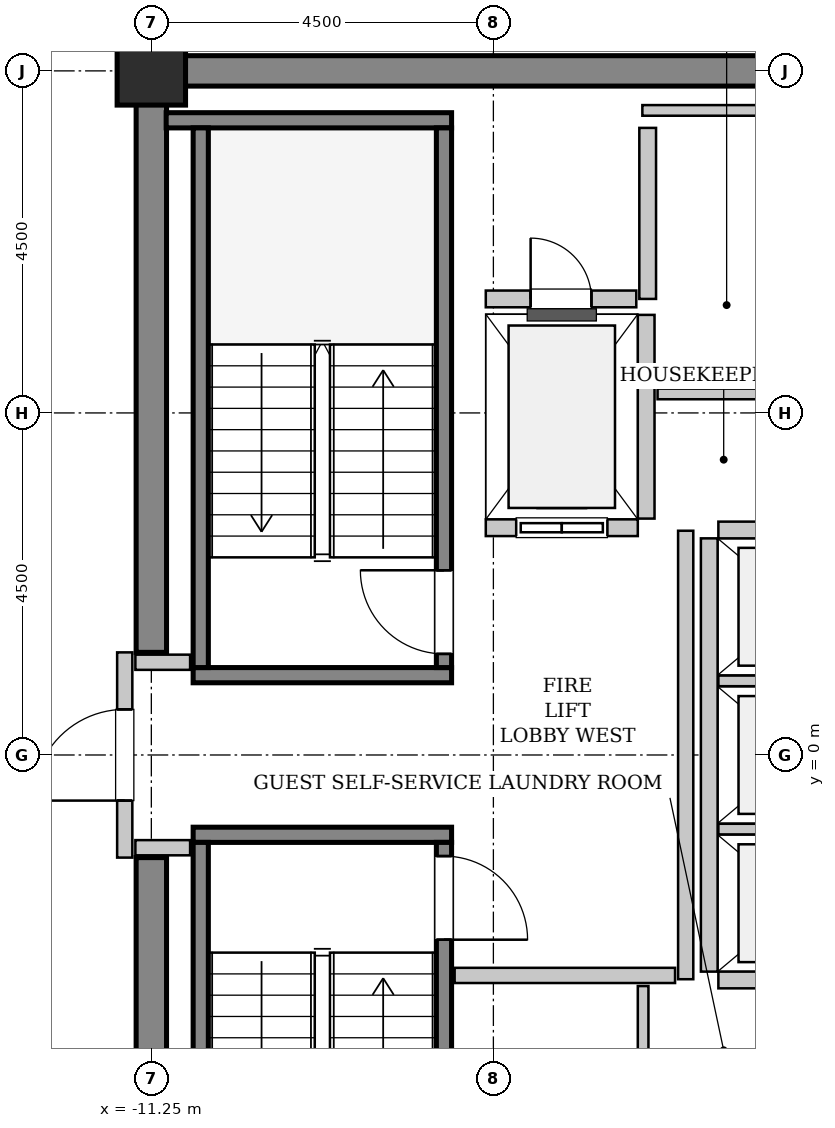
"""IFC4 building model, lengths in metres.
Left out: names, types, materials, properties, quantities, classifications, styles, units other than length and angle.
Written with IfcOpenShell. Run it as: python <this file> out.ifc"""

import sys

from ifc_helpers import new_model, si_unit, direction, frame, frame_2d, origin, origin_2d, place, context, subcontext, project, spatial, rectangle, extrude, source, transform, mapped, element, fill, save


model = new_model("IFC4")
c1 = context("Model", 3, precision=1e-05, world=origin(), true_north=direction((0.0, 1.0)))
c2 = subcontext(c1, "Body", "Model", "MODEL_VIEW")
j1 = project(units=[si_unit("LENGTHUNIT", "METRE"), si_unit("PLANEANGLEUNIT", "RADIAN")], contexts=[c1])
p1 = place(None, origin())
s1 = spatial("IfcSite", under=j1, at=p1, CompositionType="ELEMENT")
p2 = place(p1, origin())
s2 = spatial("IfcBuilding", under=s1, at=p2, CompositionType="ELEMENT")
p3 = place(p2, frame((0.0, 0.0, 333.8)))
s3 = spatial("IfcBuildingStorey", under=s2, at=p3, CompositionType="ELEMENT", Elevation=333.8)
m1 = source(origin(), c2, "Body", "SweptSolid", [
    extrude(rectangle(XDim=9.9, YDim=0.4, at=frame_2d((4.95, 0.0))), origin(), (0.0, 0.0, 1.0), 3.8),
])
p4 = place(p3, frame((-11.45, 9.0, 0.0), z_axis=(0.0, 0.0, 1.0), x_axis=(1.0, 0.0, 0.0)))
e1 = element("IfcWall", 1, at=p4, inside=s3, PredefinedType="SHEAR", context=c2, shape_type="MappedRepresentation", body=[
    mapped(m1, transform((0.0, 0.0, 0.0), x_axis=(1.0, 0.0, 0.0), y_axis=(0.0, 1.0, 0.0), z_axis=(0.0, 0.0, 1.0), scale=1.0)),
])
m2 = source(origin(), c2, "Body", "SweptSolid", [
    extrude(rectangle(XDim=7.45, YDim=0.4, at=frame_2d((3.725, 0.0))), origin(), (0.0, 0.0, 1.0), 3.8),
])
for number, where, z_axis, x_axis in (
    (2, (-11.25, -8.8, 0.0), (0.0, 0.0, 1.0), (0.0, 1.0, 0.0)),
    (3, (-11.25, 1.35, 0.0), (0.0, 0.0, 1.0), (0.0, 1.0, 0.0)),
):
    element("IfcWall", number, at=place(p3, frame(where, z_axis=z_axis, x_axis=x_axis)), inside=s3, PredefinedType="SHEAR", context=c2, shape_type="MappedRepresentation", body=[
        mapped(m2, transform((0.0, 0.0, 0.0), x_axis=(1.0, 0.0, 0.0), y_axis=(0.0, 1.0, 0.0), z_axis=(0.0, 0.0, 1.0), scale=1.0)),
    ])
m3 = source(origin(), c2, "Body", "SweptSolid", [
    extrude(rectangle(XDim=0.9, YDim=0.9, at=origin_2d()), origin(), (0.0, 0.0, 1.0), 3.8),
])
p5 = place(p3, frame((-11.25, 9.0, 0.0), z_axis=(0.0, 0.0, 1.0), x_axis=(1.0, 0.0, 0.0)))
e4 = element("IfcColumn", 4, at=p5, inside=s3, PredefinedType="COLUMN", context=c2, shape_type="MappedRepresentation", body=[
    mapped(m3, transform((0.0, 0.0, 0.0), x_axis=(1.0, 0.0, 0.0), y_axis=(0.0, 1.0, 0.0), z_axis=(0.0, 0.0, 1.0), scale=1.0)),
])
m4 = source(origin(), c2, "Body", "SweptSolid", [
    extrude(rectangle(XDim=3.4, YDim=0.2, at=frame_2d((1.7, 0.0))), origin(), (0.0, 0.0, 1.0), 3.8),
])
p6 = place(p3, frame((-7.3, 1.05, 0.0), z_axis=(0.0, 0.0, 1.0), x_axis=(-1.0, 0.0, 0.0)))
e5 = element("IfcWall", 5, at=p6, inside=s3, PredefinedType="SOLIDWALL", context=c2, shape_type="MappedRepresentation", body=[
    mapped(m4, transform((0.0, 0.0, 0.0), x_axis=(1.0, 0.0, 0.0), y_axis=(0.0, 1.0, 0.0), z_axis=(0.0, 0.0, 1.0), scale=1.0)),
])
m5 = source(origin(), c2, "Body", "SweptSolid", [
    extrude(rectangle(XDim=3.755, YDim=0.2, at=frame_2d((1.877, 0.0))), origin(), (0.0, 0.0, 1.0), 3.8),
])
p7 = place(p3, frame((-7.3, 8.35, 0.0), z_axis=(0.0, 0.0, 1.0), x_axis=(-1.0, 0.0, 0.0)))
e6 = element("IfcWall", 6, at=p7, inside=s3, PredefinedType="SOLIDWALL", context=c2, shape_type="MappedRepresentation", body=[
    mapped(m5, transform((0.0, 0.0, 0.0), x_axis=(1.0, 0.0, 0.0), y_axis=(0.0, 1.0, 0.0), z_axis=(0.0, 0.0, 1.0), scale=1.0)),
])
m6 = source(origin(), c2, "Body", "SweptSolid", [
    extrude(rectangle(XDim=7.1, YDim=0.2, at=frame_2d((3.55, 0.0))), origin(), (0.0, 0.0, 1.0), 3.8),
])
p8 = place(p3, frame((-7.4, 1.15, 0.0), z_axis=(0.0, 0.0, 1.0), x_axis=(0.0, 1.0, 0.0)))
e7 = element("IfcWall", 7, at=p8, inside=s3, PredefinedType="SOLIDWALL", context=c2, shape_type="MappedRepresentation", body=[
    mapped(m6, transform((0.0, 0.0, 0.0), x_axis=(1.0, 0.0, 0.0), y_axis=(0.0, 1.0, 0.0), z_axis=(0.0, 0.0, 1.0), scale=1.0)),
])
p9 = place(p8, frame((0.18, 0.0, 0.0)))
e8 = element("IfcOpeningElement", 8, at=p9, cuts=e7, PredefinedType="OPENING", context=c2, shape_type="SweptSolid", body=[
    extrude(rectangle(XDim=1.1, YDim=2.15, at=frame_2d((0.55, 1.075))), frame((0.0, 0.11, 0.0), z_axis=(0.0, -1.0, 0.0), x_axis=(1.0, 0.0, 0.0)), (0.0, 0.0, 1.0), 0.22),
])
p10 = place(p3, frame((-10.6, 1.15, 0.0), z_axis=(0.0, 0.0, 1.0), x_axis=(0.0, 1.0, 0.0)))
e9 = element("IfcWall", 9, at=p10, inside=s3, PredefinedType="SOLIDWALL", context=c2, shape_type="MappedRepresentation", body=[
    mapped(m6, transform((0.0, 0.0, 0.0), x_axis=(1.0, 0.0, 0.0), y_axis=(0.0, 1.0, 0.0), z_axis=(0.0, 0.0, 1.0), scale=1.0)),
])
p11 = place(p3, frame((-10.7, -1.05, 0.0), z_axis=(0.0, 0.0, 1.0), x_axis=(1.0, 0.0, 0.0)))
e10 = element("IfcWall", 10, at=p11, inside=s3, PredefinedType="SOLIDWALL", context=c2, shape_type="MappedRepresentation", body=[
    mapped(m4, transform((0.0, 0.0, 0.0), x_axis=(1.0, 0.0, 0.0), y_axis=(0.0, 1.0, 0.0), z_axis=(0.0, 0.0, 1.0), scale=1.0)),
])
p12 = place(p3, frame((-10.6, -1.15, 0.0), z_axis=(0.0, 0.0, 1.0), x_axis=(0.0, -1.0, 0.0)))
e11 = element("IfcWall", 11, at=p12, inside=s3, PredefinedType="SOLIDWALL", context=c2, shape_type="MappedRepresentation", body=[
    mapped(m6, transform((0.0, 0.0, 0.0), x_axis=(1.0, 0.0, 0.0), y_axis=(0.0, 1.0, 0.0), z_axis=(0.0, 0.0, 1.0), scale=1.0)),
])
p13 = place(p3, frame((-7.4, -1.15, 0.0), z_axis=(0.0, 0.0, 1.0), x_axis=(0.0, -1.0, 0.0)))
e12 = element("IfcWall", 12, at=p13, inside=s3, PredefinedType="SOLIDWALL", context=c2, shape_type="MappedRepresentation", body=[
    mapped(m6, transform((0.0, 0.0, 0.0), x_axis=(1.0, 0.0, 0.0), y_axis=(0.0, 1.0, 0.0), z_axis=(0.0, 0.0, 1.0), scale=1.0)),
])
p14 = place(p13, frame((0.18, 0.0, 0.0)))
e13 = element("IfcOpeningElement", 13, at=p14, cuts=e12, PredefinedType="OPENING", context=c2, shape_type="SweptSolid", body=[
    extrude(rectangle(XDim=1.1, YDim=2.15, at=frame_2d((0.55, 1.075))), frame((0.0, 0.11, 0.0), z_axis=(0.0, -1.0, 0.0), x_axis=(1.0, 0.0, 0.0)), (0.0, 0.0, 1.0), 0.22),
])
m7 = source(origin(), c2, "Body", "SweptSolid", [
    extrude(rectangle(XDim=2.0, YDim=0.22, at=frame_2d((1.0, 0.0))), origin(), (0.0, 0.0, 1.0), 3.535),
])
p15 = place(p3, frame((-6.85, 2.99, 0.0), z_axis=(0.0, 0.0, 1.0), x_axis=(1.0, 0.0, 0.0)))
e14 = element("IfcWall", 14, at=p15, inside=s3, PredefinedType="SOLIDWALL", context=c2, shape_type="MappedRepresentation", body=[
    mapped(m7, transform((0.0, 0.0, 0.0), x_axis=(1.0, 0.0, 0.0), y_axis=(0.0, 1.0, 0.0), z_axis=(0.0, 0.0, 1.0), scale=1.0)),
])
p16 = place(p15, frame((0.4, 0.0, 0.0)))
e15 = element("IfcOpeningElement", 15, at=p16, cuts=e14, PredefinedType="OPENING", context=c2, shape_type="SweptSolid", body=[
    extrude(rectangle(XDim=1.2, YDim=2.2, at=frame_2d((0.6, 1.1))), frame((0.0, 0.12, 0.0), z_axis=(0.0, -1.0, 0.0), x_axis=(1.0, 0.0, 0.0)), (0.0, 0.0, 1.0), 0.24),
])
m8 = source(origin(), c2, "Body", "SweptSolid", [
    extrude(rectangle(XDim=2.68, YDim=0.22, at=frame_2d((1.34, 0.0))), origin(), (0.0, 0.0, 1.0), 3.535),
])
p17 = place(p3, frame((-4.74, 3.11, 0.0), z_axis=(0.0, 0.0, 1.0), x_axis=(0.0, 1.0, 0.0)))
e16 = element("IfcWall", 16, at=p17, inside=s3, PredefinedType="SOLIDWALL", context=c2, shape_type="MappedRepresentation", body=[
    mapped(m8, transform((0.0, 0.0, 0.0), x_axis=(1.0, 0.0, 0.0), y_axis=(0.0, 1.0, 0.0), z_axis=(0.0, 0.0, 1.0), scale=1.0)),
])
m9 = source(origin(), c2, "Body", "SweptSolid", [
    extrude(rectangle(XDim=5.7, YDim=0.22, at=frame_2d((2.85, 0.0))), origin(), (0.0, 0.0, 1.0), 3.535),
])
p18 = place(p3, frame((-3.91, 2.85, 0.0), z_axis=(0.0, 0.0, 1.0), x_axis=(0.0, -1.0, 0.0)))
e17 = element("IfcWall", 17, at=p18, inside=s3, PredefinedType="SOLIDWALL", context=c2, shape_type="MappedRepresentation", body=[
    mapped(m9, transform((0.0, 0.0, 0.0), x_axis=(1.0, 0.0, 0.0), y_axis=(0.0, 1.0, 0.0), z_axis=(0.0, 0.0, 1.0), scale=1.0)),
])
m10 = source(origin(), c2, "Body", "SweptSolid", [
    extrude(rectangle(XDim=2.13, YDim=0.22, at=frame_2d((1.065, 0.0))), origin(), (0.0, 0.0, 1.0), 3.535),
])
p19 = place(p3, frame((-3.79, -2.96, 0.0), z_axis=(0.0, 0.0, 1.0), x_axis=(1.0, 0.0, 0.0)))
e18 = element("IfcWall", 18, at=p19, inside=s3, PredefinedType="SOLIDWALL", context=c2, shape_type="MappedRepresentation", body=[
    mapped(m10, transform((0.0, 0.0, 0.0), x_axis=(1.0, 0.0, 0.0), y_axis=(0.0, 1.0, 0.0), z_axis=(0.0, 0.0, 1.0), scale=1.0)),
])
m11 = source(origin(), c2, "Body", "SweptSolid", [
    extrude(rectangle(XDim=2.13, YDim=0.14, at=frame_2d((1.065, 0.0))), origin(), (0.0, 0.0, 1.0), 3.535),
])
for number, where, z_axis, x_axis in (
    (19, (-3.79, -0.975, 0.0), (0.0, 0.0, 1.0), (1.0, 0.0, 0.0)),
    (20, (-3.79, 0.975, 0.0), (0.0, 0.0, 1.0), (1.0, 0.0, 0.0)),
):
    element("IfcWall", number, at=place(p3, frame(where, z_axis=z_axis, x_axis=x_axis)), inside=s3, PredefinedType="PARTITIONING", context=c2, shape_type="MappedRepresentation", body=[
        mapped(m11, transform((0.0, 0.0, 0.0), x_axis=(1.0, 0.0, 0.0), y_axis=(0.0, 1.0, 0.0), z_axis=(0.0, 0.0, 1.0), scale=1.0)),
    ])
p20 = place(p3, frame((-1.66, 2.96, 0.0), z_axis=(0.0, 0.0, 1.0), x_axis=(-1.0, 0.0, 0.0)))
e21 = element("IfcWall", 21, at=p20, inside=s3, PredefinedType="SOLIDWALL", context=c2, shape_type="MappedRepresentation", body=[
    mapped(m10, transform((0.0, 0.0, 0.0), x_axis=(1.0, 0.0, 0.0), y_axis=(0.0, 1.0, 0.0), z_axis=(0.0, 0.0, 1.0), scale=1.0)),
])
m12 = source(origin(), c2, "Body", "SweptSolid", [
    extrude(rectangle(XDim=2.25, YDim=0.22, at=frame_2d((1.125, 0.0))), origin(), (0.0, 0.0, 1.0), 3.535),
])
p21 = place(p3, frame((-4.72, 6.0, 0.0), z_axis=(0.0, 0.0, 1.0), x_axis=(0.0, 1.0, 0.0)))
e22 = element("IfcWall", 22, at=p21, inside=s3, PredefinedType="SOLIDWALL", context=c2, shape_type="MappedRepresentation", body=[
    mapped(m12, transform((0.0, 0.0, 0.0), x_axis=(1.0, 0.0, 0.0), y_axis=(0.0, 1.0, 0.0), z_axis=(0.0, 0.0, 1.0), scale=1.0)),
])
m13 = source(origin(), c2, "Body", "SweptSolid", [
    extrude(rectangle(XDim=1.98, YDim=0.22, at=frame_2d((0.99, 0.0))), origin(), (0.0, 0.0, 1.0), 3.535),
])
p22 = place(p3, frame((-6.85, 6.0, 0.0), z_axis=(0.0, 0.0, 1.0), x_axis=(1.0, 0.0, 0.0)))
e23 = element("IfcWall", 23, at=p22, inside=s3, PredefinedType="SOLIDWALL", context=c2, shape_type="MappedRepresentation", body=[
    mapped(m13, transform((0.0, 0.0, 0.0), x_axis=(1.0, 0.0, 0.0), y_axis=(0.0, 1.0, 0.0), z_axis=(0.0, 0.0, 1.0), scale=1.0)),
])
p23 = place(p22, frame((0.59, 0.0, 0.0)))
e24 = element("IfcOpeningElement", 24, at=p23, cuts=e23, PredefinedType="OPENING", context=c2, shape_type="SweptSolid", body=[
    extrude(rectangle(XDim=0.8, YDim=2.0, at=frame_2d((0.4, 1.0))), frame((0.0, 0.12, 0.0), z_axis=(0.0, -1.0, 0.0), x_axis=(1.0, 0.0, 0.0)), (0.0, 0.0, 1.0), 0.24),
])
m14 = source(origin(), c2, "Body", "SweptSolid", [
    extrude(rectangle(XDim=2.7, YDim=0.2, at=frame_2d((1.35, 0.0))), origin(), (0.0, 0.0, 1.0), 2.625),
])
p24 = place(p3, frame((-11.6, -1.35, 0.0), z_axis=(0.0, 0.0, 1.0), x_axis=(0.0, 1.0, 0.0)))
e25 = element("IfcWall", 25, at=p24, inside=s3, PredefinedType="PARTITIONING", context=c2, shape_type="MappedRepresentation", body=[
    mapped(m14, transform((0.0, 0.0, 0.0), x_axis=(1.0, 0.0, 0.0), y_axis=(0.0, 1.0, 0.0), z_axis=(0.0, 0.0, 1.0), scale=1.0)),
])
p25 = place(p24, frame((0.75, 0.0, 0.0)))
e26 = element("IfcOpeningElement", 26, at=p25, cuts=e25, PredefinedType="OPENING", context=c2, shape_type="SweptSolid", body=[
    extrude(rectangle(XDim=1.2, YDim=2.15, at=frame_2d((0.6, 1.075))), frame((0.0, 0.11, 0.0), z_axis=(0.0, -1.0, 0.0), x_axis=(1.0, 0.0, 0.0)), (0.0, 0.0, 1.0), 0.22),
])
m15 = source(origin(), c2, "Body", "SweptSolid", [
    extrude(rectangle(XDim=5.9, YDim=0.2, at=frame_2d((2.95, 0.0))), origin(), (0.0, 0.0, 1.0), 3.535),
])
p26 = place(p3, frame((-4.22, -2.95, 0.0), z_axis=(0.0, 0.0, 1.0), x_axis=(0.0, 1.0, 0.0)))
e27 = element("IfcWall", 27, at=p26, inside=s3, PredefinedType="PARTITIONING", context=c2, shape_type="MappedRepresentation", body=[
    mapped(m15, transform((0.0, 0.0, 0.0), x_axis=(1.0, 0.0, 0.0), y_axis=(0.0, 1.0, 0.0), z_axis=(0.0, 0.0, 1.0), scale=1.0)),
])
m16 = source(origin(), c2, "Body", "SweptSolid", [
    extrude(rectangle(XDim=2.9, YDim=0.2, at=frame_2d((1.45, 0.0))), origin(), (0.0, 0.0, 1.0), 3.535),
])
p27 = place(p3, frame((-7.26, -2.9, 0.0), z_axis=(0.0, 0.0, 1.0), x_axis=(1.0, 0.0, 0.0)))
e28 = element("IfcWall", 28, at=p27, inside=s3, PredefinedType="PARTITIONING", context=c2, shape_type="MappedRepresentation", body=[
    mapped(m16, transform((0.0, 0.0, 0.0), x_axis=(1.0, 0.0, 0.0), y_axis=(0.0, 1.0, 0.0), z_axis=(0.0, 0.0, 1.0), scale=1.0)),
])
m17 = source(origin(), c2, "Body", "SweptSolid", [
    extrude(rectangle(XDim=0.72, YDim=0.2, at=frame_2d((0.36, 0.0))), origin(), (0.0, 0.0, 1.0), 3.535),
])
for number, where, z_axis, x_axis in (
    (29, (-11.46, 1.22, 0.0), (0.0, 0.0, 1.0), (1.0, 0.0, 0.0)),
    (30, (-11.46, -1.22, 0.0), (0.0, 0.0, 1.0), (1.0, 0.0, 0.0)),
):
    element("IfcWall", number, at=place(p3, frame(where, z_axis=z_axis, x_axis=x_axis)), inside=s3, PredefinedType="PARTITIONING", context=c2, shape_type="MappedRepresentation", body=[
        mapped(m17, transform((0.0, 0.0, 0.0), x_axis=(1.0, 0.0, 0.0), y_axis=(0.0, 1.0, 0.0), z_axis=(0.0, 0.0, 1.0), scale=1.0)),
    ])
m18 = source(origin(), c2, "Body", "SweptSolid", [
    extrude(rectangle(XDim=2.95, YDim=0.14, at=frame_2d((1.475, 0.0))), origin(), (0.0, 0.0, 1.0), 3.535),
])
p28 = place(p3, frame((-4.59, 4.75, 0.0), z_axis=(0.0, 0.0, 1.0), x_axis=(1.0, 0.0, 0.0)))
e31 = element("IfcWall", 31, at=p28, inside=s3, PredefinedType="PARTITIONING", context=c2, shape_type="MappedRepresentation", body=[
    mapped(m18, transform((0.0, 0.0, 0.0), x_axis=(1.0, 0.0, 0.0), y_axis=(0.0, 1.0, 0.0), z_axis=(0.0, 0.0, 1.0), scale=1.0)),
])
m19 = source(origin(), c2, "Body", "SweptSolid", [
    extrude(rectangle(XDim=3.15, YDim=0.14, at=frame_2d((1.575, 0.0))), origin(), (0.0, 0.0, 1.0), 3.535),
])
p29 = place(p3, frame((-4.79, 8.48, 0.0), z_axis=(0.0, 0.0, 1.0), x_axis=(1.0, 0.0, 0.0)))
e32 = element("IfcWall", 32, at=p29, inside=s3, PredefinedType="PARTITIONING", context=c2, shape_type="MappedRepresentation", body=[
    mapped(m19, transform((0.0, 0.0, 0.0), x_axis=(1.0, 0.0, 0.0), y_axis=(0.0, 1.0, 0.0), z_axis=(0.0, 0.0, 1.0), scale=1.0)),
])
m20 = source(origin(), c2, "Body", "SweptSolid", [
    extrude(rectangle(XDim=1.6, YDim=0.14, at=frame_2d((0.8, 0.0))), origin(), (0.0, 0.0, 1.0), 3.535),
])
p30 = place(p3, frame((-4.78, -4.64, 0.0), z_axis=(0.0, 0.0, 1.0), x_axis=(0.0, 1.0, 0.0)))
e33 = element("IfcWall", 33, at=p30, inside=s3, PredefinedType="PARTITIONING", context=c2, shape_type="MappedRepresentation", body=[
    mapped(m20, transform((0.0, 0.0, 0.0), x_axis=(1.0, 0.0, 0.0), y_axis=(0.0, 1.0, 0.0), z_axis=(0.0, 0.0, 1.0), scale=1.0)),
])
m21 = source(origin(), c2, "Body", "SweptSolid", [
    extrude(rectangle(XDim=1.1, YDim=2.15, at=frame_2d((0.55, 1.075))), frame((0.0, 0.025, 0.0), z_axis=(0.0, -1.0, 0.0), x_axis=(1.0, 0.0, 0.0)), (0.0, 0.0, 1.0), 0.05),
])
p31 = place(p9, origin())
e34 = element("IfcDoor", 34, at=p31, inside=s3, OperationType="SINGLE_SWING_RIGHT", PredefinedType="DOOR", context=c2, shape_type="MappedRepresentation", body=[
    mapped(m21, transform((0.0, 0.0, 0.0), x_axis=(1.0, 0.0, 0.0), y_axis=(0.0, 1.0, 0.0), z_axis=(0.0, 0.0, 1.0), scale=1.0)),
])
fill(e8, e34)
p32 = place(p14, origin())
e35 = element("IfcDoor", 35, at=p32, inside=s3, OperationType="SINGLE_SWING_RIGHT", PredefinedType="DOOR", context=c2, shape_type="MappedRepresentation", body=[
    mapped(m21, transform((0.0, 0.0, 0.0), x_axis=(1.0, 0.0, 0.0), y_axis=(0.0, 1.0, 0.0), z_axis=(0.0, 0.0, 1.0), scale=1.0)),
])
fill(e13, e35)
m22 = source(origin(), c2, "Body", "SweptSolid", [
    extrude(rectangle(XDim=1.2, YDim=2.2, at=frame_2d((0.6, 1.1))), frame((0.0, 0.025, 0.0), z_axis=(0.0, -1.0, 0.0), x_axis=(1.0, 0.0, 0.0)), (0.0, 0.0, 1.0), 0.05),
])
p33 = place(p16, origin())
e36 = element("IfcDoor", 36, at=p33, inside=s3, OperationType="SLIDING_TO_LEFT", PredefinedType="DOOR", context=c2, shape_type="MappedRepresentation", body=[
    mapped(m22, transform((0.0, 0.0, 0.0), x_axis=(1.0, 0.0, 0.0), y_axis=(0.0, 1.0, 0.0), z_axis=(0.0, 0.0, 1.0), scale=1.0)),
])
fill(e15, e36)
m23 = source(origin(), c2, "Body", "SweptSolid", [
    extrude(rectangle(XDim=0.8, YDim=2.0, at=frame_2d((0.4, 1.0))), frame((0.0, 0.025, 0.0), z_axis=(0.0, -1.0, 0.0), x_axis=(1.0, 0.0, 0.0)), (0.0, 0.0, 1.0), 0.05),
])
p34 = place(p23, origin())
e37 = element("IfcDoor", 37, at=p34, inside=s3, OperationType="SINGLE_SWING_LEFT", PredefinedType="TRAPDOOR", context=c2, shape_type="MappedRepresentation", body=[
    mapped(m23, transform((0.0, 0.0, 0.0), x_axis=(1.0, 0.0, 0.0), y_axis=(0.0, 1.0, 0.0), z_axis=(0.0, 0.0, 1.0), scale=1.0)),
])
fill(e24, e37)
m24 = source(origin(), c2, "Body", "SweptSolid", [
    extrude(rectangle(XDim=1.2, YDim=2.15, at=frame_2d((0.6, 1.075))), frame((0.0, 0.025, 0.0), z_axis=(0.0, -1.0, 0.0), x_axis=(1.0, 0.0, 0.0)), (0.0, 0.0, 1.0), 0.05),
])
p35 = place(p25, origin())
e38 = element("IfcDoor", 38, at=p35, inside=s3, OperationType="SINGLE_SWING_LEFT", PredefinedType="DOOR", context=c2, shape_type="MappedRepresentation", body=[
    mapped(m24, transform((0.0, 0.0, 0.0), x_axis=(1.0, 0.0, 0.0), y_axis=(0.0, 1.0, 0.0), z_axis=(0.0, 0.0, 1.0), scale=1.0)),
])
fill(e26, e38)
save(model, sys.argv[1])
